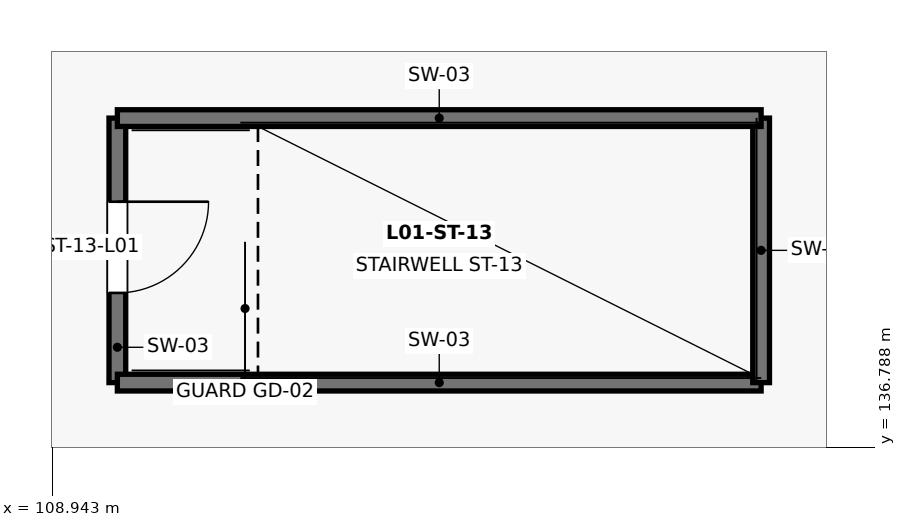
"""IFC4 building model, lengths in metres.
Left out: names, types, materials, properties, quantities, classifications, styles, units other than length and angle.
Written with IfcOpenShell. Run it as: python <this file> out.ifc"""

import sys

from ifc_helpers import new_model, si_unit, direction, frame, frame_2d, origin, place, context, subcontext, project, spatial, rectangle, extrude, element, fill, save


model = new_model("IFC4")
c1 = context("Model", 3, precision=1e-05, world=origin(), true_north=direction((0.0, 1.0)))
c2 = subcontext(c1, "Body", "Model", "MODEL_VIEW")
j1 = project(units=[si_unit("LENGTHUNIT", "METRE"), si_unit("PLANEANGLEUNIT", "RADIAN")], contexts=[c1])
p1 = place(None, origin())
s1 = spatial("IfcSite", under=j1, at=p1, CompositionType="ELEMENT")
p2 = place(p1, origin())
s2 = spatial("IfcBuilding", under=s1, at=p2, CompositionType="ELEMENT")
p3 = place(p2, frame((0.0, 0.0, 6.6)))
s3 = spatial("IfcBuildingStorey", under=s2, at=p3, CompositionType="ELEMENT", Elevation=6.6)
p4 = place(p3, frame((109.8, 141.12, 0.0), z_axis=(0.0, 0.0, 1.0), x_axis=(0.0, -1.0, 0.0)))
e1 = element("IfcWall", 1, at=p4, inside=s3, PredefinedType="SHEAR", context=c2, shape_type="SweptSolid", body=[
    extrude(rectangle(XDim=3.48, YDim=0.22, at=frame_2d((1.74, 0.0))), origin(), (0.0, 0.0, 1.0), 4.59),
])
p5 = place(p4, frame((1.1, 0.0, 0.0)))
e2 = element("IfcOpeningElement", 2, at=p5, cuts=e1, PredefinedType="OPENING", context=c2, shape_type="SweptSolid", body=[
    extrude(rectangle(XDim=1.2, YDim=2.2, at=frame_2d((0.6, 1.1))), frame((0.0, 0.125, 0.0), z_axis=(0.0, -1.0, 0.0), x_axis=(1.0, 0.0, 0.0)), (0.0, 0.0, 1.0), 0.25),
])
p6 = place(p3, frame((109.8, 137.64, 0.0), z_axis=(0.0, 0.0, 1.0), x_axis=(1.0, 0.0, 0.0)))
e3 = element("IfcWall", 3, at=p6, inside=s3, PredefinedType="SHEAR", context=c2, shape_type="SweptSolid", body=[
    extrude(rectangle(XDim=8.47, YDim=0.22, at=frame_2d((4.235, 0.0))), origin(), (0.0, 0.0, 1.0), 4.59),
])
p7 = place(p3, frame((118.27, 137.64, 0.0), z_axis=(0.0, 0.0, 1.0), x_axis=(0.0, 1.0, 0.0)))
e4 = element("IfcWall", 4, at=p7, inside=s3, PredefinedType="SHEAR", context=c2, shape_type="SweptSolid", body=[
    extrude(rectangle(XDim=3.48, YDim=0.22, at=frame_2d((1.74, 0.0))), origin(), (0.0, 0.0, 1.0), 4.59),
])
p8 = place(p3, frame((118.27, 141.12, 0.0), z_axis=(0.0, 0.0, 1.0), x_axis=(-1.0, 0.0, 0.0)))
e5 = element("IfcWall", 5, at=p8, inside=s3, PredefinedType="SHEAR", context=c2, shape_type="SweptSolid", body=[
    extrude(rectangle(XDim=8.47, YDim=0.22, at=frame_2d((4.235, 0.0))), origin(), (0.0, 0.0, 1.0), 4.59),
])
p9 = place(p5, origin())
e6 = element("IfcDoor", 6, at=p9, inside=s3, OperationType="SINGLE_SWING_LEFT", PredefinedType="DOOR", context=c2, shape_type="SweptSolid", body=[
    extrude(rectangle(XDim=1.2, YDim=2.2, at=frame_2d((0.6, 1.1))), frame((0.0, 0.025, 0.0), z_axis=(0.0, -1.0, 0.0), x_axis=(1.0, 0.0, 0.0)), (0.0, 0.0, 1.0), 0.05),
])
fill(e2, e6)
save(model, sys.argv[1])
